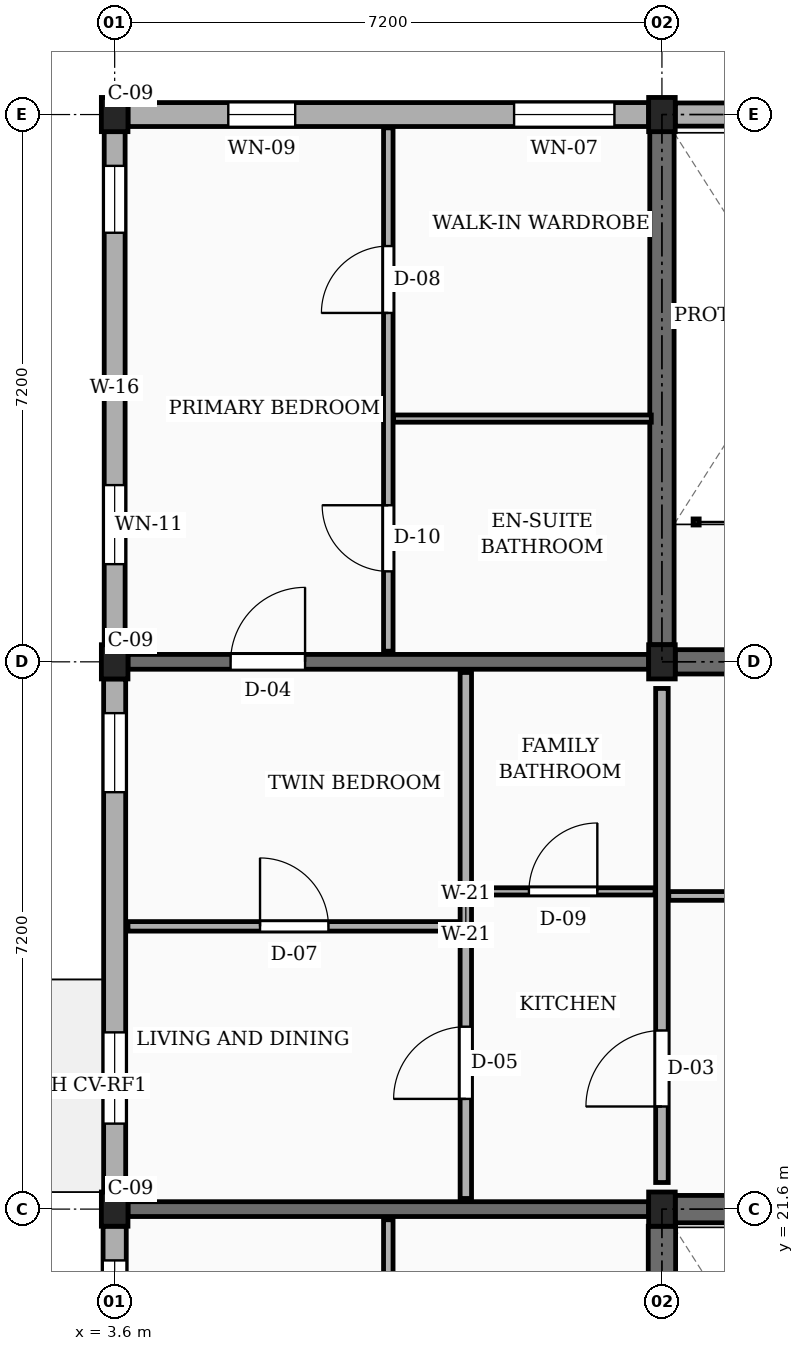
"""IFC4 building model, lengths in metres.
Left out: names, types, materials, properties, quantities, classifications, styles, units other than length and angle.
Written with IfcOpenShell. Run it as: python <this file> out.ifc"""

import sys

from ifc_helpers import new_model, si_unit, direction, frame, frame_2d, origin, origin_2d, place, context, subcontext, project, spatial, rectangle, extrude, element, fill, save


model = new_model("IFC4")
c1 = context("Model", 3, precision=1e-05, world=origin(), true_north=direction((0.0, 1.0)))
c2 = subcontext(c1, "Body", "Model", "MODEL_VIEW")
j1 = project(units=[si_unit("LENGTHUNIT", "METRE"), si_unit("PLANEANGLEUNIT", "RADIAN")], contexts=[c1])
p1 = place(None, origin())
s1 = spatial("IfcSite", under=j1, at=p1, CompositionType="ELEMENT")
p2 = place(p1, origin())
s2 = spatial("IfcBuilding", under=s1, at=p2, CompositionType="ELEMENT")
p3 = place(p2, frame((0.0, 0.0, 48.6)))
s3 = spatial("IfcBuildingStorey", under=s2, at=p3, CompositionType="ELEMENT", Elevation=48.6)
for number, where, z_axis, x_axis in (
    (1, (3.6, 21.6, 0.0), (0.0, 0.0, 1.0), (1.0, 0.0, 0.0)),
    (2, (3.6, 28.8, 0.0), (0.0, 0.0, 1.0), (1.0, 0.0, 0.0)),
    (3, (3.6, 36.0, 0.0), (0.0, 0.0, 1.0), (1.0, 0.0, 0.0)),
    (4, (10.8, 21.6, 0.0), (0.0, 0.0, 1.0), (1.0, 0.0, 0.0)),
    (5, (10.8, 28.8, 0.0), (0.0, 0.0, 1.0), (1.0, 0.0, 0.0)),
    (6, (10.8, 36.0, 0.0), (0.0, 0.0, 1.0), (1.0, 0.0, 0.0)),
):
    element("IfcColumn", number, at=place(p3, frame(where, z_axis=z_axis, x_axis=x_axis)), inside=s3, PredefinedType="COLUMN", context=c2, shape_type="SweptSolid", body=[
        extrude(rectangle(XDim=0.35, YDim=0.45, at=origin_2d()), origin(), (0.0, 0.0, 1.0), 3.15),
    ])
p4 = place(p3, frame((3.775, 21.6, 0.0), z_axis=(0.0, 0.0, 1.0), x_axis=(1.0, 0.0, 0.0)))
e7 = element("IfcWall", 7, at=p4, inside=s3, PredefinedType="SOLIDWALL", context=c2, shape_type="SweptSolid", body=[
    extrude(rectangle(XDim=6.85, YDim=0.195, at=frame_2d((3.425, 0.0))), origin(), (0.0, 0.0, 1.0), 2.22),
])
p5 = place(p3, frame((3.775, 28.8, 0.0), z_axis=(0.0, 0.0, 1.0), x_axis=(1.0, 0.0, 0.0)))
e8 = element("IfcWall", 8, at=p5, inside=s3, PredefinedType="SOLIDWALL", context=c2, shape_type="SweptSolid", body=[
    extrude(rectangle(XDim=6.85, YDim=0.195, at=frame_2d((3.425, 0.0))), origin(), (0.0, 0.0, 1.0), 2.22),
])
p6 = place(p5, frame((1.35, 0.0, 0.0)))
e9 = element("IfcOpeningElement", 9, at=p6, cuts=e8, PredefinedType="OPENING", context=c2, shape_type="SweptSolid", body=[
    extrude(rectangle(XDim=0.98, YDim=2.12, at=frame_2d((0.49, 1.06))), frame((0.0, 0.107, 0.0), z_axis=(0.0, -1.0, 0.0), x_axis=(1.0, 0.0, 0.0)), (0.0, 0.0, 1.0), 0.215),
])
p7 = place(p3, frame((17.825, 36.0, 0.0), z_axis=(0.0, 0.0, 1.0), x_axis=(-1.0, 0.0, 0.0)))
e10 = element("IfcWall", 10, at=p7, inside=s3, PredefinedType="SOLIDWALL", context=c2, shape_type="SweptSolid", body=[
    extrude(rectangle(XDim=6.85, YDim=0.305, at=frame_2d((3.425, 0.0))), origin(), (0.0, 0.0, 1.0), 2.46),
])
p8 = place(p7, frame((3.0, 0.0, 0.9)))
e11 = element("IfcOpeningElement", 11, at=p8, cuts=e10, PredefinedType="OPENING", context=c2, shape_type="SweptSolid", body=[
    extrude(rectangle(XDim=0.85, YDim=1.15, at=frame_2d((0.425, 0.575))), frame((0.0, 0.163, 0.0), z_axis=(0.0, -1.0, 0.0), x_axis=(1.0, 0.0, 0.0)), (0.0, 0.0, 1.0), 0.325),
])
p9 = place(p3, frame((10.625, 36.0, 0.0), z_axis=(0.0, 0.0, 1.0), x_axis=(-1.0, 0.0, 0.0)))
e12 = element("IfcWall", 12, at=p9, inside=s3, PredefinedType="SOLIDWALL", context=c2, shape_type="SweptSolid", body=[
    extrude(rectangle(XDim=6.85, YDim=0.315, at=frame_2d((3.425, 0.0))), origin(), (0.0, 0.0, 1.0), 2.46),
])
p10 = place(p9, frame((0.45, 0.0, 0.78)))
e13 = element("IfcOpeningElement", 13, at=p10, cuts=e12, PredefinedType="OPENING", context=c2, shape_type="SweptSolid", body=[
    extrude(rectangle(XDim=1.32, YDim=1.15, at=frame_2d((0.66, 0.575))), frame((0.0, 0.167, 0.0), z_axis=(0.0, -1.0, 0.0), x_axis=(1.0, 0.0, 0.0)), (0.0, 0.0, 1.0), 0.335),
])
p11 = place(p9, frame((4.65, 0.0, 0.78)))
e14 = element("IfcOpeningElement", 14, at=p11, cuts=e12, PredefinedType="OPENING", context=c2, shape_type="SweptSolid", body=[
    extrude(rectangle(XDim=0.88, YDim=1.26, at=frame_2d((0.44, 0.63))), frame((0.0, 0.167, 0.0), z_axis=(0.0, -1.0, 0.0), x_axis=(1.0, 0.0, 0.0)), (0.0, 0.0, 1.0), 0.335),
])
p12 = place(p3, frame((3.6, 35.775, 0.0), z_axis=(0.0, 0.0, 1.0), x_axis=(0.0, -1.0, 0.0)))
e15 = element("IfcWall", 15, at=p12, inside=s3, PredefinedType="SOLIDWALL", context=c2, shape_type="SweptSolid", body=[
    extrude(rectangle(XDim=6.75, YDim=0.275, at=frame_2d((3.375, 0.0))), origin(), (0.0, 0.0, 1.0), 2.46),
])
p13 = place(p12, frame((0.45, 0.0, 0.78)))
e16 = element("IfcOpeningElement", 16, at=p13, cuts=e15, PredefinedType="OPENING", context=c2, shape_type="SweptSolid", body=[
    extrude(rectangle(XDim=0.88, YDim=1.26, at=frame_2d((0.44, 0.63))), frame((0.0, 0.147, 0.0), z_axis=(0.0, -1.0, 0.0), x_axis=(1.0, 0.0, 0.0)), (0.0, 0.0, 1.0), 0.295),
])
p14 = place(p12, frame((4.65, 0.0, 0.78)))
e17 = element("IfcOpeningElement", 17, at=p14, cuts=e15, PredefinedType="OPENING", context=c2, shape_type="SweptSolid", body=[
    extrude(rectangle(XDim=1.04, YDim=1.26, at=frame_2d((0.52, 0.63))), frame((0.0, 0.147, 0.0), z_axis=(0.0, -1.0, 0.0), x_axis=(1.0, 0.0, 0.0)), (0.0, 0.0, 1.0), 0.295),
])
p15 = place(p3, frame((3.6, 28.575, 0.0), z_axis=(0.0, 0.0, 1.0), x_axis=(0.0, -1.0, 0.0)))
e18 = element("IfcWall", 18, at=p15, inside=s3, PredefinedType="SOLIDWALL", context=c2, shape_type="SweptSolid", body=[
    extrude(rectangle(XDim=6.75, YDim=0.29, at=frame_2d((3.375, 0.0))), origin(), (0.0, 0.0, 1.0), 2.46),
])
p16 = place(p15, frame((0.45, 0.0, 0.78)))
e19 = element("IfcOpeningElement", 19, at=p16, cuts=e18, PredefinedType="OPENING", context=c2, shape_type="SweptSolid", body=[
    extrude(rectangle(XDim=1.04, YDim=1.26, at=frame_2d((0.52, 0.63))), frame((0.0, 0.155, 0.0), z_axis=(0.0, -1.0, 0.0), x_axis=(1.0, 0.0, 0.0)), (0.0, 0.0, 1.0), 0.31),
])
p17 = place(p15, frame((4.65, 0.0, 0.78)))
e20 = element("IfcOpeningElement", 20, at=p17, cuts=e18, PredefinedType="OPENING", context=c2, shape_type="SweptSolid", body=[
    extrude(rectangle(XDim=1.2, YDim=1.26, at=frame_2d((0.6, 0.63))), frame((0.0, 0.155, 0.0), z_axis=(0.0, -1.0, 0.0), x_axis=(1.0, 0.0, 0.0)), (0.0, 0.0, 1.0), 0.31),
])
p18 = place(p3, frame((3.6, 21.375, 0.0), z_axis=(0.0, 0.0, 1.0), x_axis=(0.0, -1.0, 0.0)))
e21 = element("IfcWall", 21, at=p18, inside=s3, PredefinedType="SOLIDWALL", context=c2, shape_type="SweptSolid", body=[
    extrude(rectangle(XDim=6.75, YDim=0.305, at=frame_2d((3.375, 0.0))), origin(), (0.0, 0.0, 1.0), 2.46),
])
p19 = place(p18, frame((0.45, 0.0, 0.78)))
e22 = element("IfcOpeningElement", 22, at=p19, cuts=e21, PredefinedType="OPENING", context=c2, shape_type="SweptSolid", body=[
    extrude(rectangle(XDim=1.2, YDim=1.26, at=frame_2d((0.6, 0.63))), frame((0.0, 0.163, 0.0), z_axis=(0.0, -1.0, 0.0), x_axis=(1.0, 0.0, 0.0)), (0.0, 0.0, 1.0), 0.325),
])
p20 = place(p18, frame((4.65, 0.0, 0.78)))
e23 = element("IfcOpeningElement", 23, at=p20, cuts=e21, PredefinedType="OPENING", context=c2, shape_type="SweptSolid", body=[
    extrude(rectangle(XDim=1.36, YDim=1.26, at=frame_2d((0.68, 0.63))), frame((0.0, 0.163, 0.0), z_axis=(0.0, -1.0, 0.0), x_axis=(1.0, 0.0, 0.0)), (0.0, 0.0, 1.0), 0.325),
])
p21 = place(p3, frame((10.8, 14.625, 0.0), z_axis=(0.0, 0.0, 1.0), x_axis=(0.0, 1.0, 0.0)))
e24 = element("IfcWall", 24, at=p21, inside=s3, PredefinedType="SHEAR", context=c2, shape_type="SweptSolid", body=[
    extrude(rectangle(XDim=6.75, YDim=0.36, at=frame_2d((3.375, 0.0))), origin(), (0.0, 0.0, 1.0), 2.89),
])
p22 = place(p3, frame((10.975, 21.6, 0.0), z_axis=(0.0, 0.0, 1.0), x_axis=(1.0, 0.0, 0.0)))
e25 = element("IfcWall", 25, at=p22, inside=s3, PredefinedType="SHEAR", context=c2, shape_type="SweptSolid", body=[
    extrude(rectangle(XDim=6.85, YDim=0.36, at=frame_2d((3.425, 0.0))), origin(), (0.0, 0.0, 1.0), 2.89),
])
p23 = place(p3, frame((10.8, 29.025, 0.0), z_axis=(0.0, 0.0, 1.0), x_axis=(0.0, 1.0, 0.0)))
e26 = element("IfcWall", 26, at=p23, inside=s3, PredefinedType="SHEAR", context=c2, shape_type="SweptSolid", body=[
    extrude(rectangle(XDim=6.75, YDim=0.32, at=frame_2d((3.375, 0.0))), origin(), (0.0, 0.0, 1.0), 2.89),
])
p24 = place(p3, frame((10.975, 28.8, 0.0), z_axis=(0.0, 0.0, 1.0), x_axis=(1.0, 0.0, 0.0)))
e27 = element("IfcWall", 27, at=p24, inside=s3, PredefinedType="SHEAR", context=c2, shape_type="SweptSolid", body=[
    extrude(rectangle(XDim=6.85, YDim=0.32, at=frame_2d((3.425, 0.0))), origin(), (0.0, 0.0, 1.0), 2.89),
])
p25 = place(p3, frame((10.8, 21.95, 0.0), z_axis=(0.0, 0.0, 1.0), x_axis=(0.0, 1.0, 0.0)))
e28 = element("IfcWall", 28, at=p25, inside=s3, PredefinedType="PARTITIONING", context=c2, shape_type="SweptSolid", body=[
    extrude(rectangle(XDim=6.5, YDim=0.165, at=frame_2d((3.25, 0.0))), origin(), (0.0, 0.0, 1.0), 2.325),
])
p26 = place(p25, frame((1.0, 0.0, 0.0)))
e29 = element("IfcOpeningElement", 29, at=p26, cuts=e28, PredefinedType="OPENING", context=c2, shape_type="SweptSolid", body=[
    extrude(rectangle(XDim=1.0, YDim=2.15, at=frame_2d((0.5, 1.075))), frame((0.0, 0.093, 0.0), z_axis=(0.0, -1.0, 0.0), x_axis=(1.0, 0.0, 0.0)), (0.0, 0.0, 1.0), 0.185),
])
p27 = place(p3, frame((7.2, 14.54, 0.0), z_axis=(0.0, 0.0, 1.0), x_axis=(0.0, 1.0, 0.0)))
e30 = element("IfcWall", 30, at=p27, inside=s3, PredefinedType="PARTITIONING", context=c2, shape_type="SweptSolid", body=[
    extrude(rectangle(XDim=6.92, YDim=0.125, at=frame_2d((3.46, 0.0))), origin(), (0.0, 0.0, 1.0), 2.325),
])
p28 = place(p27, frame((1.05, 0.0, 0.0)))
e31 = element("IfcOpeningElement", 31, at=p28, cuts=e30, PredefinedType="OPENING", context=c2, shape_type="SweptSolid", body=[
    extrude(rectangle(XDim=0.87, YDim=2.05, at=frame_2d((0.435, 1.025))), frame((0.0, 0.073, 0.0), z_axis=(0.0, -1.0, 0.0), x_axis=(1.0, 0.0, 0.0)), (0.0, 0.0, 1.0), 0.145),
])
p29 = place(p27, frame((4.45, 0.0, 0.0)))
e32 = element("IfcOpeningElement", 32, at=p29, cuts=e30, PredefinedType="OPENING", context=c2, shape_type="SweptSolid", body=[
    extrude(rectangle(XDim=0.88, YDim=2.08, at=frame_2d((0.44, 1.04))), frame((0.0, 0.073, 0.0), z_axis=(0.0, -1.0, 0.0), x_axis=(1.0, 0.0, 0.0)), (0.0, 0.0, 1.0), 0.145),
])
p30 = place(p3, frame((10.89, 25.72, 0.0), z_axis=(0.0, 0.0, 1.0), x_axis=(1.0, 0.0, 0.0)))
e33 = element("IfcWall", 33, at=p30, inside=s3, PredefinedType="PARTITIONING", context=c2, shape_type="SweptSolid", body=[
    extrude(rectangle(XDim=7.02, YDim=0.115, at=frame_2d((3.51, 0.0))), origin(), (0.0, 0.0, 1.0), 2.325),
])
p31 = place(p30, frame((2.85, 0.0, 0.0)))
e34 = element("IfcOpeningElement", 34, at=p31, cuts=e33, PredefinedType="OPENING", context=c2, shape_type="SweptSolid", body=[
    extrude(rectangle(XDim=1.02, YDim=2.15, at=frame_2d((0.51, 1.075))), frame((0.0, 0.067, 0.0), z_axis=(0.0, -1.0, 0.0), x_axis=(1.0, 0.0, 0.0)), (0.0, 0.0, 1.0), 0.135),
])
p32 = place(p3, frame((3.775, 25.32, 0.0), z_axis=(0.0, 0.0, 1.0), x_axis=(1.0, 0.0, 0.0)))
e35 = element("IfcWall", 35, at=p32, inside=s3, PredefinedType="PARTITIONING", context=c2, shape_type="SweptSolid", body=[
    extrude(rectangle(XDim=4.375, YDim=0.125, at=frame_2d((2.188, 0.0))), origin(), (0.0, 0.0, 1.0), 2.325),
])
p33 = place(p32, frame((1.738, 0.0, 0.0)))
e36 = element("IfcOpeningElement", 36, at=p33, cuts=e35, PredefinedType="OPENING", context=c2, shape_type="SweptSolid", body=[
    extrude(rectangle(XDim=0.9, YDim=2.1, at=frame_2d((0.45, 1.05))), frame((0.0, 0.073, 0.0), z_axis=(0.0, -1.0, 0.0), x_axis=(1.0, 0.0, 0.0)), (0.0, 0.0, 1.0), 0.145),
])
p34 = place(p3, frame((8.29, 25.78, 0.0), z_axis=(0.0, 0.0, 1.0), x_axis=(1.0, 0.0, 0.0)))
e37 = element("IfcWall", 37, at=p34, inside=s3, PredefinedType="PARTITIONING", context=c2, shape_type="SweptSolid", body=[
    extrude(rectangle(XDim=2.42, YDim=0.095, at=frame_2d((1.21, 0.0))), origin(), (0.0, 0.0, 1.0), 2.325),
])
p35 = place(p34, frame((0.76, 0.0, 0.0)))
e38 = element("IfcOpeningElement", 38, at=p35, cuts=e37, PredefinedType="OPENING", context=c2, shape_type="SweptSolid", body=[
    extrude(rectangle(XDim=0.9, YDim=2.05, at=frame_2d((0.45, 1.025))), frame((0.0, 0.058, 0.0), z_axis=(0.0, -1.0, 0.0), x_axis=(1.0, 0.0, 0.0)), (0.0, 0.0, 1.0), 0.115),
])
p36 = place(p3, frame((8.22, 21.74, 0.0), z_axis=(0.0, 0.0, 1.0), x_axis=(0.0, 1.0, 0.0)))
e39 = element("IfcWall", 39, at=p36, inside=s3, PredefinedType="PARTITIONING", context=c2, shape_type="SweptSolid", body=[
    extrude(rectangle(XDim=6.92, YDim=0.15, at=frame_2d((3.46, 0.0))), origin(), (0.0, 0.0, 1.0), 2.325),
])
p37 = place(p36, frame((1.31, 0.0, 0.0)))
e40 = element("IfcOpeningElement", 40, at=p37, cuts=e39, PredefinedType="OPENING", context=c2, shape_type="SweptSolid", body=[
    extrude(rectangle(XDim=0.95, YDim=2.1, at=frame_2d((0.475, 1.05))), frame((0.0, 0.085, 0.0), z_axis=(0.0, -1.0, 0.0), x_axis=(1.0, 0.0, 0.0)), (0.0, 0.0, 1.0), 0.17),
])
p38 = place(p3, frame((7.2, 28.94, 0.0), z_axis=(0.0, 0.0, 1.0), x_axis=(0.0, 1.0, 0.0)))
e41 = element("IfcWall", 41, at=p38, inside=s3, PredefinedType="PARTITIONING", context=c2, shape_type="SweptSolid", body=[
    extrude(rectangle(XDim=6.885, YDim=0.125, at=frame_2d((3.442, 0.0))), origin(), (0.0, 0.0, 1.0), 2.325),
])
p39 = place(p38, frame((1.05, 0.0, 0.0)))
e42 = element("IfcOpeningElement", 42, at=p39, cuts=e41, PredefinedType="OPENING", context=c2, shape_type="SweptSolid", body=[
    extrude(rectangle(XDim=0.87, YDim=2.05, at=frame_2d((0.435, 1.025))), frame((0.0, 0.073, 0.0), z_axis=(0.0, -1.0, 0.0), x_axis=(1.0, 0.0, 0.0)), (0.0, 0.0, 1.0), 0.145),
])
p40 = place(p38, frame((4.45, 0.0, 0.0)))
e43 = element("IfcOpeningElement", 43, at=p40, cuts=e41, PredefinedType="OPENING", context=c2, shape_type="SweptSolid", body=[
    extrude(rectangle(XDim=0.88, YDim=2.08, at=frame_2d((0.44, 1.04))), frame((0.0, 0.073, 0.0), z_axis=(0.0, -1.0, 0.0), x_axis=(1.0, 0.0, 0.0)), (0.0, 0.0, 1.0), 0.145),
])
p41 = place(p3, frame((7.27, 32.0, 0.0), z_axis=(0.0, 0.0, 1.0), x_axis=(1.0, 0.0, 0.0)))
e44 = element("IfcWall", 44, at=p41, inside=s3, PredefinedType="PARTITIONING", context=c2, shape_type="SweptSolid", body=[
    extrude(rectangle(XDim=3.39, YDim=0.095, at=frame_2d((1.695, 0.0))), origin(), (0.0, 0.0, 1.0), 2.325),
])
p42 = place(p10, origin())
e45 = element("IfcWindow", 45, at=p42, inside=s3, PartitioningType="SINGLE_PANEL", PredefinedType="WINDOW", context=c2, shape_type="SweptSolid", body=[
    extrude(rectangle(XDim=1.32, YDim=1.15, at=frame_2d((0.66, 0.575))), frame((0.0, 0.03, 0.0), z_axis=(0.0, -1.0, 0.0), x_axis=(1.0, 0.0, 0.0)), (0.0, 0.0, 1.0), 0.06),
])
fill(e13, e45)
p43 = place(p11, origin())
e46 = element("IfcWindow", 46, at=p43, inside=s3, PartitioningType="SINGLE_PANEL", PredefinedType="WINDOW", context=c2, shape_type="SweptSolid", body=[
    extrude(rectangle(XDim=0.88, YDim=1.26, at=frame_2d((0.44, 0.63))), frame((0.0, 0.03, 0.0), z_axis=(0.0, -1.0, 0.0), x_axis=(1.0, 0.0, 0.0)), (0.0, 0.0, 1.0), 0.06),
])
fill(e14, e46)
p44 = place(p13, origin())
e47 = element("IfcWindow", 47, at=p44, inside=s3, PartitioningType="SINGLE_PANEL", PredefinedType="WINDOW", context=c2, shape_type="SweptSolid", body=[
    extrude(rectangle(XDim=0.88, YDim=1.26, at=frame_2d((0.44, 0.63))), frame((0.0, 0.03, 0.0), z_axis=(0.0, -1.0, 0.0), x_axis=(1.0, 0.0, 0.0)), (0.0, 0.0, 1.0), 0.06),
])
fill(e16, e47)
p45 = place(p14, origin())
e48 = element("IfcWindow", 48, at=p45, inside=s3, PartitioningType="SINGLE_PANEL", PredefinedType="WINDOW", context=c2, shape_type="SweptSolid", body=[
    extrude(rectangle(XDim=1.04, YDim=1.26, at=frame_2d((0.52, 0.63))), frame((0.0, 0.03, 0.0), z_axis=(0.0, -1.0, 0.0), x_axis=(1.0, 0.0, 0.0)), (0.0, 0.0, 1.0), 0.06),
])
fill(e17, e48)
p46 = place(p16, origin())
e49 = element("IfcWindow", 49, at=p46, inside=s3, PartitioningType="SINGLE_PANEL", PredefinedType="WINDOW", context=c2, shape_type="SweptSolid", body=[
    extrude(rectangle(XDim=1.04, YDim=1.26, at=frame_2d((0.52, 0.63))), frame((0.0, 0.03, 0.0), z_axis=(0.0, -1.0, 0.0), x_axis=(1.0, 0.0, 0.0)), (0.0, 0.0, 1.0), 0.06),
])
fill(e19, e49)
p47 = place(p17, origin())
e50 = element("IfcWindow", 50, at=p47, inside=s3, PartitioningType="SINGLE_PANEL", PredefinedType="WINDOW", context=c2, shape_type="SweptSolid", body=[
    extrude(rectangle(XDim=1.2, YDim=1.26, at=frame_2d((0.6, 0.63))), frame((0.0, 0.03, 0.0), z_axis=(0.0, -1.0, 0.0), x_axis=(1.0, 0.0, 0.0)), (0.0, 0.0, 1.0), 0.06),
])
fill(e20, e50)
p48 = place(p19, origin())
e51 = element("IfcWindow", 51, at=p48, inside=s3, PartitioningType="SINGLE_PANEL", PredefinedType="WINDOW", context=c2, shape_type="SweptSolid", body=[
    extrude(rectangle(XDim=1.2, YDim=1.26, at=frame_2d((0.6, 0.63))), frame((0.0, 0.03, 0.0), z_axis=(0.0, -1.0, 0.0), x_axis=(1.0, 0.0, 0.0)), (0.0, 0.0, 1.0), 0.06),
])
fill(e22, e51)
p49 = place(p26, origin())
e52 = element("IfcDoor", 52, at=p49, inside=s3, OperationType="SINGLE_SWING_LEFT", PredefinedType="DOOR", context=c2, shape_type="SweptSolid", body=[
    extrude(rectangle(XDim=1.0, YDim=2.15, at=frame_2d((0.5, 1.075))), frame((0.0, 0.025, 0.0), z_axis=(0.0, -1.0, 0.0), x_axis=(1.0, 0.0, 0.0)), (0.0, 0.0, 1.0), 0.05),
])
fill(e29, e52)
p50 = place(p33, origin())
e53 = element("IfcDoor", 53, at=p50, inside=s3, OperationType="SINGLE_SWING_LEFT", PredefinedType="DOOR", context=c2, shape_type="SweptSolid", body=[
    extrude(rectangle(XDim=0.9, YDim=2.1, at=frame_2d((0.45, 1.05))), frame((0.0, 0.025, 0.0), z_axis=(0.0, -1.0, 0.0), x_axis=(1.0, 0.0, 0.0)), (0.0, 0.0, 1.0), 0.05),
])
fill(e36, e53)
p51 = place(p35, origin())
e54 = element("IfcDoor", 54, at=p51, inside=s3, OperationType="SINGLE_SWING_RIGHT", PredefinedType="DOOR", context=c2, shape_type="SweptSolid", body=[
    extrude(rectangle(XDim=0.9, YDim=2.05, at=frame_2d((0.45, 1.025))), frame((0.0, 0.025, 0.0), z_axis=(0.0, -1.0, 0.0), x_axis=(1.0, 0.0, 0.0)), (0.0, 0.0, 1.0), 0.05),
])
fill(e38, e54)
p52 = place(p37, origin())
e55 = element("IfcDoor", 55, at=p52, inside=s3, OperationType="SINGLE_SWING_LEFT", PredefinedType="DOOR", context=c2, shape_type="SweptSolid", body=[
    extrude(rectangle(XDim=0.95, YDim=2.1, at=frame_2d((0.475, 1.05))), frame((0.0, 0.025, 0.0), z_axis=(0.0, -1.0, 0.0), x_axis=(1.0, 0.0, 0.0)), (0.0, 0.0, 1.0), 0.05),
])
fill(e40, e55)
p53 = place(p39, origin())
e56 = element("IfcDoor", 56, at=p53, inside=s3, OperationType="SINGLE_SWING_RIGHT", PredefinedType="DOOR", context=c2, shape_type="SweptSolid", body=[
    extrude(rectangle(XDim=0.87, YDim=2.05, at=frame_2d((0.435, 1.025))), frame((0.0, 0.025, 0.0), z_axis=(0.0, -1.0, 0.0), x_axis=(1.0, 0.0, 0.0)), (0.0, 0.0, 1.0), 0.05),
])
fill(e42, e56)
p54 = place(p40, origin())
e57 = element("IfcDoor", 57, at=p54, inside=s3, OperationType="SINGLE_SWING_LEFT", PredefinedType="DOOR", context=c2, shape_type="SweptSolid", body=[
    extrude(rectangle(XDim=0.88, YDim=2.08, at=frame_2d((0.44, 1.04))), frame((0.0, 0.025, 0.0), z_axis=(0.0, -1.0, 0.0), x_axis=(1.0, 0.0, 0.0)), (0.0, 0.0, 1.0), 0.05),
])
fill(e43, e57)
p55 = place(p6, origin())
e58 = element("IfcDoor", 58, at=p55, inside=s3, OperationType="SINGLE_SWING_RIGHT", PredefinedType="DOOR", context=c2, shape_type="SweptSolid", body=[
    extrude(rectangle(XDim=0.98, YDim=2.12, at=frame_2d((0.49, 1.06))), frame((0.0, 0.025, 0.0), z_axis=(0.0, -1.0, 0.0), x_axis=(1.0, 0.0, 0.0)), (0.0, 0.0, 1.0), 0.05),
])
fill(e9, e58)
save(model, sys.argv[1])
